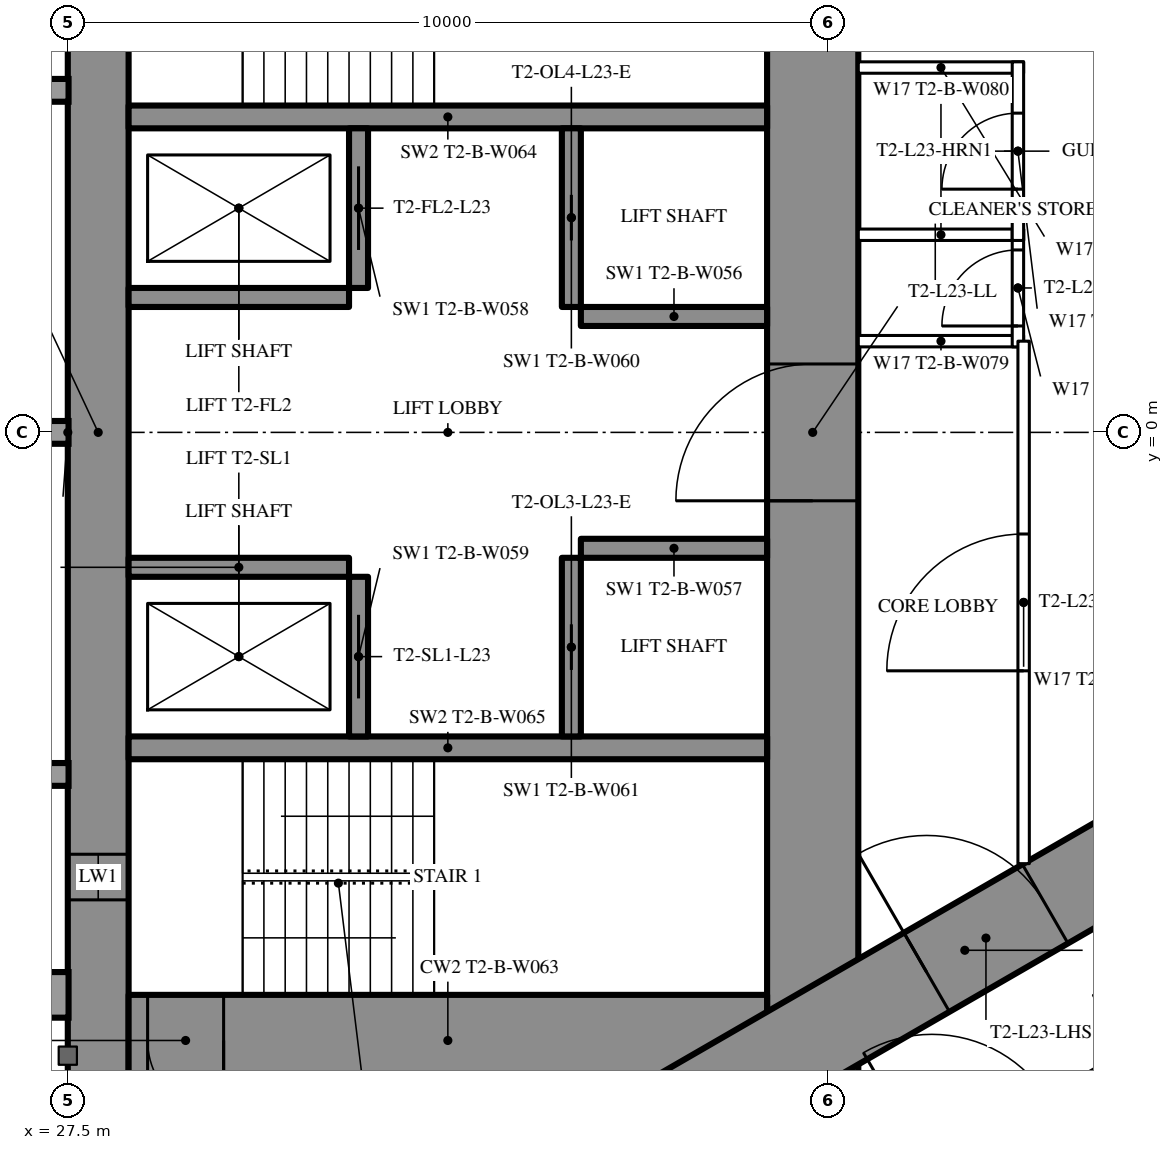
"""IFC4 building model, lengths in metres.
Left out: names, types, materials, properties, quantities, classifications, styles, units other than length and angle.
Written with IfcOpenShell. Run it as: python <this file> out.ifc"""

import sys

from ifc_helpers import new_model, si_unit, direction, frame, frame_2d, origin, place, context, subcontext, project, spatial, rectangle, extrude, element, fill, save


model = new_model("IFC4")
c1 = context("Model", 3, precision=1e-05, world=origin(), true_north=direction((0.0, 1.0)))
c2 = subcontext(c1, "Body", "Model", "MODEL_VIEW")
j1 = project(units=[si_unit("LENGTHUNIT", "METRE"), si_unit("PLANEANGLEUNIT", "RADIAN")], contexts=[c1])
p1 = place(None, origin())
s1 = spatial("IfcSite", under=j1, at=p1, CompositionType="ELEMENT")
p2 = place(p1, origin())
s2 = spatial("IfcBuilding", under=s1, at=p2, CompositionType="ELEMENT")
p3 = place(p2, frame((0.0, 0.0, 90.6)))
s3 = spatial("IfcBuildingStorey", under=s2, at=p3, CompositionType="ELEMENT", Elevation=90.6)
p4 = place(p3, frame((27.9, -8.6, 0.0), z_axis=(0.0, 0.0, 1.0), x_axis=(0.0, 1.0, 0.0)))
e1 = element("IfcWall", 1, at=p4, inside=s3, PredefinedType="SHEAR", context=c2, shape_type="SweptSolid", body=[
    extrude(rectangle(XDim=17.2, YDim=0.8, at=frame_2d((8.6, 0.0))), origin(), (0.0, 0.0, 1.0), 3.5),
])
p5 = place(p4, frame((2.45, 0.0, 0.6)))
e2 = element("IfcOpeningElement", 2, at=p5, cuts=e1, PredefinedType="OPENING", context=c2, shape_type="SweptSolid", body=[
    extrude(rectangle(XDim=0.6, YDim=2.1, at=frame_2d((0.3, 1.05))), frame((0.0, 0.41, 0.0), z_axis=(0.0, -1.0, 0.0), x_axis=(1.0, 0.0, 0.0)), (0.0, 0.0, 1.0), 0.82),
])
p6 = place(p4, frame((14.15, 0.0, 0.6)))
e3 = element("IfcOpeningElement", 3, at=p6, cuts=e1, PredefinedType="OPENING", context=c2, shape_type="SweptSolid", body=[
    extrude(rectangle(XDim=0.6, YDim=2.1, at=frame_2d((0.3, 1.05))), frame((0.0, 0.41, 0.0), z_axis=(0.0, -1.0, 0.0), x_axis=(1.0, 0.0, 0.0)), (0.0, 0.0, 1.0), 0.82),
])
p7 = place(p3, frame((37.3, -8.6, 0.0), z_axis=(0.0, 0.0, 1.0), x_axis=(0.0, 1.0, 0.0)))
e4 = element("IfcWall", 4, at=p7, inside=s3, PredefinedType="SHEAR", context=c2, shape_type="SweptSolid", body=[
    extrude(rectangle(XDim=17.2, YDim=1.2, at=frame_2d((8.6, 0.0))), origin(), (0.0, 0.0, 1.0), 3.5),
])
p8 = place(p7, frame((7.7, 0.0, 0.0)))
e5 = element("IfcOpeningElement", 5, at=p8, cuts=e4, PredefinedType="OPENING", context=c2, shape_type="SweptSolid", body=[
    extrude(rectangle(XDim=1.8, YDim=2.2, at=frame_2d((0.9, 1.1))), frame((0.0, 0.61, 0.0), z_axis=(0.0, -1.0, 0.0), x_axis=(1.0, 0.0, 0.0)), (0.0, 0.0, 1.0), 1.22),
])
p9 = place(p3, frame((28.3, -8.0, 0.0), z_axis=(0.0, 0.0, 1.0), x_axis=(1.0, 0.0, 0.0)))
e6 = element("IfcWall", 6, at=p9, inside=s3, PredefinedType="SHEAR", context=c2, shape_type="SweptSolid", body=[
    extrude(rectangle(XDim=8.4, YDim=1.2, at=frame_2d((4.2, 0.0))), origin(), (0.0, 0.0, 1.0), 3.5),
])
p10 = place(p9, frame((0.25, 0.0, 0.0)))
e7 = element("IfcOpeningElement", 7, at=p10, cuts=e6, PredefinedType="OPENING", context=c2, shape_type="SweptSolid", body=[
    extrude(rectangle(XDim=1.0, YDim=2.2, at=frame_2d((0.5, 1.1))), frame((0.0, 0.61, 0.0), z_axis=(0.0, -1.0, 0.0), x_axis=(1.0, 0.0, 0.0)), (0.0, 0.0, 1.0), 1.22),
])
for number, where, z_axis, x_axis in (
    (8, (28.3, -4.15, 0.0), (0.0, 0.0, 1.0), (1.0, 0.0, 0.0)),
    (9, (28.3, 4.15, 0.0), (0.0, 0.0, 1.0), (1.0, 0.0, 0.0)),
):
    element("IfcWall", number, at=place(p3, frame(where, z_axis=z_axis, x_axis=x_axis)), inside=s3, PredefinedType="SHEAR", context=c2, shape_type="SweptSolid", body=[
        extrude(rectangle(XDim=8.4, YDim=0.3, at=frame_2d((4.2, 0.0))), origin(), (0.0, 0.0, 1.0), 3.5),
    ])
p11 = place(p3, frame((31.325, -4.0, 0.0), z_axis=(0.0, 0.0, 1.0), x_axis=(0.0, 1.0, 0.0)))
e10 = element("IfcWall", 10, at=p11, inside=s3, PredefinedType="SHEAR", context=c2, shape_type="SweptSolid", body=[
    extrude(rectangle(XDim=2.1, YDim=0.25, at=frame_2d((1.05, 0.0))), origin(), (0.0, 0.0, 1.0), 3.5),
])
p12 = place(p11, frame((0.5, 0.0, 0.0)))
e11 = element("IfcOpeningElement", 11, at=p12, cuts=e10, PredefinedType="OPENING", context=c2, shape_type="SweptSolid", body=[
    extrude(rectangle(XDim=1.1, YDim=2.2, at=frame_2d((0.55, 1.1))), frame((0.0, 0.135, 0.0), z_axis=(0.0, -1.0, 0.0), x_axis=(1.0, 0.0, 0.0)), (0.0, 0.0, 1.0), 0.27),
])
p13 = place(p3, frame((34.125, -4.0, 0.0), z_axis=(0.0, 0.0, 1.0), x_axis=(0.0, 1.0, 0.0)))
e12 = element("IfcWall", 12, at=p13, inside=s3, PredefinedType="SHEAR", context=c2, shape_type="SweptSolid", body=[
    extrude(rectangle(XDim=2.35, YDim=0.25, at=frame_2d((1.175, 0.0))), origin(), (0.0, 0.0, 1.0), 3.5),
])
p14 = place(p13, frame((0.875, 0.0, 0.0)))
e13 = element("IfcOpeningElement", 13, at=p14, cuts=e12, PredefinedType="OPENING", context=c2, shape_type="SweptSolid", body=[
    extrude(rectangle(XDim=0.6, YDim=2.0, at=frame_2d((0.3, 1.0))), frame((0.0, 0.135, 0.0), z_axis=(0.0, -1.0, 0.0), x_axis=(1.0, 0.0, 0.0)), (0.0, 0.0, 1.0), 0.27),
])
p15 = place(p3, frame((28.3, -1.775, 0.0), z_axis=(0.0, 0.0, 1.0), x_axis=(1.0, 0.0, 0.0)))
e14 = element("IfcWall", 14, at=p15, inside=s3, PredefinedType="SHEAR", context=c2, shape_type="SweptSolid", body=[
    extrude(rectangle(XDim=2.9, YDim=0.25, at=frame_2d((1.45, 0.0))), origin(), (0.0, 0.0, 1.0), 3.5),
])
p16 = place(p3, frame((34.25, -1.525, 0.0), z_axis=(0.0, 0.0, 1.0), x_axis=(1.0, 0.0, 0.0)))
e15 = element("IfcWall", 15, at=p16, inside=s3, PredefinedType="SHEAR", context=c2, shape_type="SweptSolid", body=[
    extrude(rectangle(XDim=2.45, YDim=0.25, at=frame_2d((1.225, 0.0))), origin(), (0.0, 0.0, 1.0), 3.5),
])
p17 = place(p3, frame((31.325, 1.9, 0.0), z_axis=(0.0, 0.0, 1.0), x_axis=(0.0, 1.0, 0.0)))
e16 = element("IfcWall", 16, at=p17, inside=s3, PredefinedType="SHEAR", context=c2, shape_type="SweptSolid", body=[
    extrude(rectangle(XDim=2.1, YDim=0.25, at=frame_2d((1.05, 0.0))), origin(), (0.0, 0.0, 1.0), 3.5),
])
p18 = place(p17, frame((0.5, 0.0, 0.0)))
e17 = element("IfcOpeningElement", 17, at=p18, cuts=e16, PredefinedType="OPENING", context=c2, shape_type="SweptSolid", body=[
    extrude(rectangle(XDim=1.1, YDim=2.2, at=frame_2d((0.55, 1.1))), frame((0.0, 0.135, 0.0), z_axis=(0.0, -1.0, 0.0), x_axis=(1.0, 0.0, 0.0)), (0.0, 0.0, 1.0), 0.27),
])
p19 = place(p3, frame((34.125, 1.65, 0.0), z_axis=(0.0, 0.0, 1.0), x_axis=(0.0, 1.0, 0.0)))
e18 = element("IfcWall", 18, at=p19, inside=s3, PredefinedType="SHEAR", context=c2, shape_type="SweptSolid", body=[
    extrude(rectangle(XDim=2.35, YDim=0.25, at=frame_2d((1.175, 0.0))), origin(), (0.0, 0.0, 1.0), 3.5),
])
p20 = place(p19, frame((0.875, 0.0, 0.0)))
e19 = element("IfcOpeningElement", 19, at=p20, cuts=e18, PredefinedType="OPENING", context=c2, shape_type="SweptSolid", body=[
    extrude(rectangle(XDim=0.6, YDim=2.0, at=frame_2d((0.3, 1.0))), frame((0.0, 0.135, 0.0), z_axis=(0.0, -1.0, 0.0), x_axis=(1.0, 0.0, 0.0)), (0.0, 0.0, 1.0), 0.27),
])
p21 = place(p3, frame((28.3, 1.775, 0.0), z_axis=(0.0, 0.0, 1.0), x_axis=(1.0, 0.0, 0.0)))
e20 = element("IfcWall", 20, at=p21, inside=s3, PredefinedType="SHEAR", context=c2, shape_type="SweptSolid", body=[
    extrude(rectangle(XDim=2.9, YDim=0.25, at=frame_2d((1.45, 0.0))), origin(), (0.0, 0.0, 1.0), 3.5),
])
p22 = place(p3, frame((34.25, 1.525, 0.0), z_axis=(0.0, 0.0, 1.0), x_axis=(1.0, 0.0, 0.0)))
e21 = element("IfcWall", 21, at=p22, inside=s3, PredefinedType="SHEAR", context=c2, shape_type="SweptSolid", body=[
    extrude(rectangle(XDim=2.45, YDim=0.25, at=frame_2d((1.225, 0.0))), origin(), (0.0, 0.0, 1.0), 3.5),
])
p23 = place(p3, frame((27.2, -13.8, 0.0), z_axis=(0.0, 0.0, 1.0), x_axis=(0.866027159892, 0.499996958321, 0.0)))
e22 = element("IfcWall", 22, at=p23, inside=s3, PredefinedType="SHEAR", context=c2, shape_type="SweptSolid", body=[
    extrude(rectangle(XDim=27.947, YDim=1.2, at=frame_2d((13.973, 0.0))), origin(), (0.0, 0.0, 1.0), 3.5),
])
p24 = place(p23, frame((4.6, 0.0, 0.0)))
e23 = element("IfcOpeningElement", 23, at=p24, cuts=e22, PredefinedType="OPENING", context=c2, shape_type="SweptSolid", body=[
    extrude(rectangle(XDim=1.0, YDim=2.2, at=frame_2d((0.5, 1.1))), frame((0.0, 0.61, 0.0), z_axis=(0.0, -1.0, 0.0), x_axis=(1.0, 0.0, 0.0)), (0.0, 0.0, 1.0), 1.22),
])
p25 = place(p23, frame((13.395, 0.0, 0.0)))
e24 = element("IfcOpeningElement", 24, at=p25, cuts=e22, PredefinedType="OPENING", context=c2, shape_type="SweptSolid", body=[
    extrude(rectangle(XDim=1.8, YDim=2.2, at=frame_2d((0.9, 1.1))), frame((0.0, 0.61, 0.0), z_axis=(0.0, -1.0, 0.0), x_axis=(1.0, 0.0, 0.0)), (0.0, 0.0, 1.0), 1.22),
])
p26 = place(p3, frame((27.2, 13.8, 0.0), z_axis=(0.0, 0.0, 1.0), x_axis=(0.866024515034, -0.500001539357, 0.0)))
e25 = element("IfcWall", 25, at=p26, inside=s3, PredefinedType="SHEAR", context=c2, shape_type="SweptSolid", body=[
    extrude(rectangle(XDim=26.907, YDim=1.2, at=frame_2d((13.454, 0.0))), origin(), (0.0, 0.0, 1.0), 3.5),
])
p27 = place(p26, frame((4.6, 0.0, 0.0)))
e26 = element("IfcOpeningElement", 26, at=p27, cuts=e25, PredefinedType="OPENING", context=c2, shape_type="SweptSolid", body=[
    extrude(rectangle(XDim=1.0, YDim=2.2, at=frame_2d((0.5, 1.1))), frame((0.0, 0.61, 0.0), z_axis=(0.0, -1.0, 0.0), x_axis=(1.0, 0.0, 0.0)), (0.0, 0.0, 1.0), 1.22),
])
p28 = place(p26, frame((13.395, 0.0, 0.0)))
e27 = element("IfcOpeningElement", 27, at=p28, cuts=e25, PredefinedType="OPENING", context=c2, shape_type="SweptSolid", body=[
    extrude(rectangle(XDim=1.8, YDim=2.2, at=frame_2d((0.9, 1.1))), frame((0.0, 0.61, 0.0), z_axis=(0.0, -1.0, 0.0), x_axis=(1.0, 0.0, 0.0)), (0.0, 0.0, 1.0), 1.22),
])
p29 = place(p3, frame((37.96, -10.243, 0.0), z_axis=(0.0, 0.0, 1.0), x_axis=(0.866026429433, 0.499998223521, 0.0)))
e28 = element("IfcWall", 28, at=p29, inside=s3, PredefinedType="PARTITIONING", context=c2, shape_type="SweptSolid", body=[
    extrude(rectangle(XDim=20.487, YDim=0.2, at=frame_2d((10.243, 0.0))), origin(), (0.0, 0.0, 1.0), 3.25),
])
p30 = place(p29, frame((4.047, 0.0, 0.0)))
e29 = element("IfcOpeningElement", 29, at=p30, cuts=e28, PredefinedType="OPENING", context=c2, shape_type="SweptSolid", body=[
    extrude(rectangle(XDim=0.95, YDim=2.2, at=frame_2d((0.475, 1.1))), frame((0.0, 0.11, 0.0), z_axis=(0.0, -1.0, 0.0), x_axis=(1.0, 0.0, 0.0)), (0.0, 0.0, 1.0), 0.22),
])
p31 = place(p29, frame((11.04, 0.0, 0.0)))
e30 = element("IfcOpeningElement", 30, at=p31, cuts=e28, PredefinedType="OPENING", context=c2, shape_type="SweptSolid", body=[
    extrude(rectangle(XDim=0.95, YDim=2.2, at=frame_2d((0.475, 1.1))), frame((0.0, 0.11, 0.0), z_axis=(0.0, -1.0, 0.0), x_axis=(1.0, 0.0, 0.0)), (0.0, 0.0, 1.0), 0.22),
])
p32 = place(p29, frame((13.035, 0.0, 0.0)))
e31 = element("IfcOpeningElement", 31, at=p32, cuts=e28, PredefinedType="OPENING", context=c2, shape_type="SweptSolid", body=[
    extrude(rectangle(XDim=0.95, YDim=2.2, at=frame_2d((0.475, 1.1))), frame((0.0, 0.11, 0.0), z_axis=(0.0, -1.0, 0.0), x_axis=(1.0, 0.0, 0.0)), (0.0, 0.0, 1.0), 0.22),
])
p33 = place(p29, frame((17.085, 0.0, 0.0)))
e32 = element("IfcOpeningElement", 32, at=p33, cuts=e28, PredefinedType="OPENING", context=c2, shape_type="SweptSolid", body=[
    extrude(rectangle(XDim=0.95, YDim=2.2, at=frame_2d((0.475, 1.1))), frame((0.0, 0.11, 0.0), z_axis=(0.0, -1.0, 0.0), x_axis=(1.0, 0.0, 0.0)), (0.0, 0.0, 1.0), 0.22),
])
p34 = place(p29, frame((1.048, 0.0, 0.0)))
e33 = element("IfcOpeningElement", 33, at=p34, cuts=e28, PredefinedType="OPENING", context=c2, shape_type="SweptSolid", body=[
    extrude(rectangle(XDim=1.8, YDim=2.2, at=frame_2d((0.9, 1.1))), frame((0.0, 0.11, 0.0), z_axis=(0.0, -1.0, 0.0), x_axis=(1.0, 0.0, 0.0)), (0.0, 0.0, 1.0), 0.22),
])
p35 = place(p3, frame((36.834, 10.894, 0.0), z_axis=(0.0, 0.0, 1.0), x_axis=(0.866028157229, -0.499995230863, 0.0)))
e34 = element("IfcWall", 34, at=p35, inside=s3, PredefinedType="PARTITIONING", context=c2, shape_type="SweptSolid", body=[
    extrude(rectangle(XDim=21.667, YDim=0.2, at=frame_2d((10.833, 0.0))), origin(), (0.0, 0.0, 1.0), 3.25),
])
p36 = place(p35, frame((14.04, 0.0, 0.0)))
e35 = element("IfcOpeningElement", 35, at=p36, cuts=e34, PredefinedType="OPENING", context=c2, shape_type="SweptSolid", body=[
    extrude(rectangle(XDim=0.95, YDim=2.2, at=frame_2d((0.475, 1.1))), frame((0.0, 0.11, 0.0), z_axis=(0.0, -1.0, 0.0), x_axis=(1.0, 0.0, 0.0)), (0.0, 0.0, 1.0), 0.22),
])
p37 = place(p35, frame((9.99, 0.0, 0.0)))
e36 = element("IfcOpeningElement", 36, at=p37, cuts=e34, PredefinedType="OPENING", context=c2, shape_type="SweptSolid", body=[
    extrude(rectangle(XDim=0.95, YDim=2.2, at=frame_2d((0.475, 1.1))), frame((0.0, 0.11, 0.0), z_axis=(0.0, -1.0, 0.0), x_axis=(1.0, 0.0, 0.0)), (0.0, 0.0, 1.0), 0.22),
])
p38 = place(p35, frame((3.35, 0.0, 0.0)))
e37 = element("IfcOpeningElement", 37, at=p38, cuts=e34, PredefinedType="OPENING", context=c2, shape_type="SweptSolid", body=[
    extrude(rectangle(XDim=1.0, YDim=2.2, at=frame_2d((0.5, 1.1))), frame((0.0, 0.11, 0.0), z_axis=(0.0, -1.0, 0.0), x_axis=(1.0, 0.0, 0.0)), (0.0, 0.0, 1.0), 0.22),
])
for number, where, z_axis, x_axis in (
    (38, (37.9, 1.2, 0.0), (0.0, 0.0, 1.0), (1.0, 0.0, 0.0)),
    (39, (37.9, 2.6, 0.0), (0.0, 0.0, 1.0), (1.0, 0.0, 0.0)),
    (40, (37.9, 4.8, 0.0), (0.0, 0.0, 1.0), (1.0, 0.0, 0.0)),
):
    element("IfcWall", number, at=place(p3, frame(where, z_axis=z_axis, x_axis=x_axis)), inside=s3, PredefinedType="PARTITIONING", context=c2, shape_type="SweptSolid", body=[
        extrude(rectangle(XDim=2.175, YDim=0.15, at=frame_2d((1.087, 0.0))), origin(), (0.0, 0.0, 1.0), 3.25),
    ])
p39 = place(p3, frame((40.0, 1.125, 0.0), z_axis=(0.0, 0.0, 1.0), x_axis=(0.0, 1.0, 0.0)))
e41 = element("IfcWall", 41, at=p39, inside=s3, PredefinedType="PARTITIONING", context=c2, shape_type="SweptSolid", body=[
    extrude(rectangle(XDim=1.55, YDim=0.15, at=frame_2d((0.775, 0.0))), origin(), (0.0, 0.0, 1.0), 3.25),
])
p40 = place(p39, frame((0.275, 0.0, 0.0)))
e42 = element("IfcOpeningElement", 42, at=p40, cuts=e41, PredefinedType="OPENING", context=c2, shape_type="SweptSolid", body=[
    extrude(rectangle(XDim=1.0, YDim=2.2, at=frame_2d((0.5, 1.1))), frame((0.0, 0.085, 0.0), z_axis=(0.0, -1.0, 0.0), x_axis=(1.0, 0.0, 0.0)), (0.0, 0.0, 1.0), 0.17),
])
p41 = place(p3, frame((40.0, 2.525, 0.0), z_axis=(0.0, 0.0, 1.0), x_axis=(0.0, 1.0, 0.0)))
e43 = element("IfcWall", 43, at=p41, inside=s3, PredefinedType="PARTITIONING", context=c2, shape_type="SweptSolid", body=[
    extrude(rectangle(XDim=2.35, YDim=0.15, at=frame_2d((1.175, 0.0))), origin(), (0.0, 0.0, 1.0), 3.25),
])
p42 = place(p41, frame((0.675, 0.0, 0.0)))
e44 = element("IfcOpeningElement", 44, at=p42, cuts=e43, PredefinedType="OPENING", context=c2, shape_type="SweptSolid", body=[
    extrude(rectangle(XDim=1.0, YDim=2.2, at=frame_2d((0.5, 1.1))), frame((0.0, 0.085, 0.0), z_axis=(0.0, -1.0, 0.0), x_axis=(1.0, 0.0, 0.0)), (0.0, 0.0, 1.0), 0.17),
])
p43 = place(p3, frame((40.075, -5.674, 0.0), z_axis=(0.0, 0.0, 1.0), x_axis=(0.0, 1.0, 0.0)))
e45 = element("IfcWall", 45, at=p43, inside=s3, PredefinedType="PARTITIONING", context=c2, shape_type="SweptSolid", body=[
    extrude(rectangle(XDim=6.874, YDim=0.15, at=frame_2d((3.437, 0.0))), origin(), (0.0, 0.0, 1.0), 3.25),
])
p44 = place(p43, frame((2.537, 0.0, 0.0)))
e46 = element("IfcOpeningElement", 46, at=p44, cuts=e45, PredefinedType="OPENING", context=c2, shape_type="SweptSolid", body=[
    extrude(rectangle(XDim=1.8, YDim=2.2, at=frame_2d((0.9, 1.1))), frame((0.0, 0.085, 0.0), z_axis=(0.0, -1.0, 0.0), x_axis=(1.0, 0.0, 0.0)), (0.0, 0.0, 1.0), 0.17),
])
p45 = place(p40, origin())
e47 = element("IfcDoor", 47, at=p45, inside=s3, OperationType="SINGLE_SWING_LEFT", PredefinedType="DOOR", context=c2, shape_type="SweptSolid", body=[
    extrude(rectangle(XDim=1.0, YDim=2.2, at=frame_2d((0.5, 1.1))), frame((0.0, 0.025, 0.0), z_axis=(0.0, -1.0, 0.0), x_axis=(1.0, 0.0, 0.0)), (0.0, 0.0, 1.0), 0.05),
])
fill(e42, e47)
p46 = place(p42, origin())
e48 = element("IfcDoor", 48, at=p46, inside=s3, OperationType="SINGLE_SWING_LEFT", PredefinedType="DOOR", context=c2, shape_type="SweptSolid", body=[
    extrude(rectangle(XDim=1.0, YDim=2.2, at=frame_2d((0.5, 1.1))), frame((0.0, 0.025, 0.0), z_axis=(0.0, -1.0, 0.0), x_axis=(1.0, 0.0, 0.0)), (0.0, 0.0, 1.0), 0.05),
])
fill(e44, e48)
p47 = place(p44, origin())
e49 = element("IfcDoor", 49, at=p47, inside=s3, OperationType="DOUBLE_DOOR_SINGLE_SWING", PredefinedType="DOOR", context=c2, shape_type="SweptSolid", body=[
    extrude(rectangle(XDim=1.8, YDim=2.2, at=frame_2d((0.9, 1.1))), frame((0.0, 0.025, 0.0), z_axis=(0.0, -1.0, 0.0), x_axis=(1.0, 0.0, 0.0)), (0.0, 0.0, 1.0), 0.05),
])
fill(e46, e49)
p48 = place(p25, origin())
e50 = element("IfcDoor", 50, at=p48, inside=s3, OperationType="DOUBLE_DOOR_SINGLE_SWING", PredefinedType="DOOR", context=c2, shape_type="SweptSolid", body=[
    extrude(rectangle(XDim=1.8, YDim=2.2, at=frame_2d((0.9, 1.1))), frame((0.0, 0.025, 0.0), z_axis=(0.0, -1.0, 0.0), x_axis=(1.0, 0.0, 0.0)), (0.0, 0.0, 1.0), 0.05),
])
fill(e24, e50)
p49 = place(p8, origin())
e51 = element("IfcDoor", 51, at=p49, inside=s3, OperationType="DOUBLE_DOOR_SINGLE_SWING", PredefinedType="DOOR", context=c2, shape_type="SweptSolid", body=[
    extrude(rectangle(XDim=1.8, YDim=2.2, at=frame_2d((0.9, 1.1))), frame((0.0, 0.025, 0.0), z_axis=(0.0, -1.0, 0.0), x_axis=(1.0, 0.0, 0.0)), (0.0, 0.0, 1.0), 0.05),
])
fill(e5, e51)
p50 = place(p10, origin())
e52 = element("IfcDoor", 52, at=p50, inside=s3, OperationType="SINGLE_SWING_RIGHT", PredefinedType="DOOR", context=c2, shape_type="SweptSolid", body=[
    extrude(rectangle(XDim=1.0, YDim=2.2, at=frame_2d((0.5, 1.1))), frame((0.0, 0.025, 0.0), z_axis=(0.0, -1.0, 0.0), x_axis=(1.0, 0.0, 0.0)), (0.0, 0.0, 1.0), 0.05),
])
fill(e7, e52)
p51 = place(p12, origin())
e53 = element("IfcDoor", 53, at=p51, inside=s3, OperationType="SLIDING_TO_LEFT", PredefinedType="USERDEFINED", context=c2, shape_type="SweptSolid", body=[
    extrude(rectangle(XDim=1.1, YDim=2.2, at=frame_2d((0.55, 1.1))), frame((0.0, 0.025, 0.0), z_axis=(0.0, -1.0, 0.0), x_axis=(1.0, 0.0, 0.0)), (0.0, 0.0, 1.0), 0.05),
])
fill(e11, e53)
p52 = place(p18, origin())
e54 = element("IfcDoor", 54, at=p52, inside=s3, OperationType="SLIDING_TO_LEFT", PredefinedType="USERDEFINED", context=c2, shape_type="SweptSolid", body=[
    extrude(rectangle(XDim=1.1, YDim=2.2, at=frame_2d((0.55, 1.1))), frame((0.0, 0.025, 0.0), z_axis=(0.0, -1.0, 0.0), x_axis=(1.0, 0.0, 0.0)), (0.0, 0.0, 1.0), 0.05),
])
fill(e17, e54)
p53 = place(p14, origin())
e55 = element("IfcDoor", 55, at=p53, inside=s3, OperationType="SLIDING_TO_LEFT", PredefinedType="DOOR", context=c2, shape_type="SweptSolid", body=[
    extrude(rectangle(XDim=0.6, YDim=2.0, at=frame_2d((0.3, 1.0))), frame((0.0, 0.025, 0.0), z_axis=(0.0, -1.0, 0.0), x_axis=(1.0, 0.0, 0.0)), (0.0, 0.0, 1.0), 0.05),
])
fill(e13, e55)
p54 = place(p20, origin())
e56 = element("IfcDoor", 56, at=p54, inside=s3, OperationType="SLIDING_TO_LEFT", PredefinedType="DOOR", context=c2, shape_type="SweptSolid", body=[
    extrude(rectangle(XDim=0.6, YDim=2.0, at=frame_2d((0.3, 1.0))), frame((0.0, 0.025, 0.0), z_axis=(0.0, -1.0, 0.0), x_axis=(1.0, 0.0, 0.0)), (0.0, 0.0, 1.0), 0.05),
])
fill(e19, e56)
p55 = place(p5, origin())
e57 = element("IfcWindow", 57, at=p55, inside=s3, PartitioningType="SINGLE_PANEL", PredefinedType="WINDOW", context=c2, shape_type="SweptSolid", body=[
    extrude(rectangle(XDim=0.6, YDim=2.1, at=frame_2d((0.3, 1.05))), frame((0.0, 0.03, 0.0), z_axis=(0.0, -1.0, 0.0), x_axis=(1.0, 0.0, 0.0)), (0.0, 0.0, 1.0), 0.06),
])
fill(e2, e57)
save(model, sys.argv[1])
